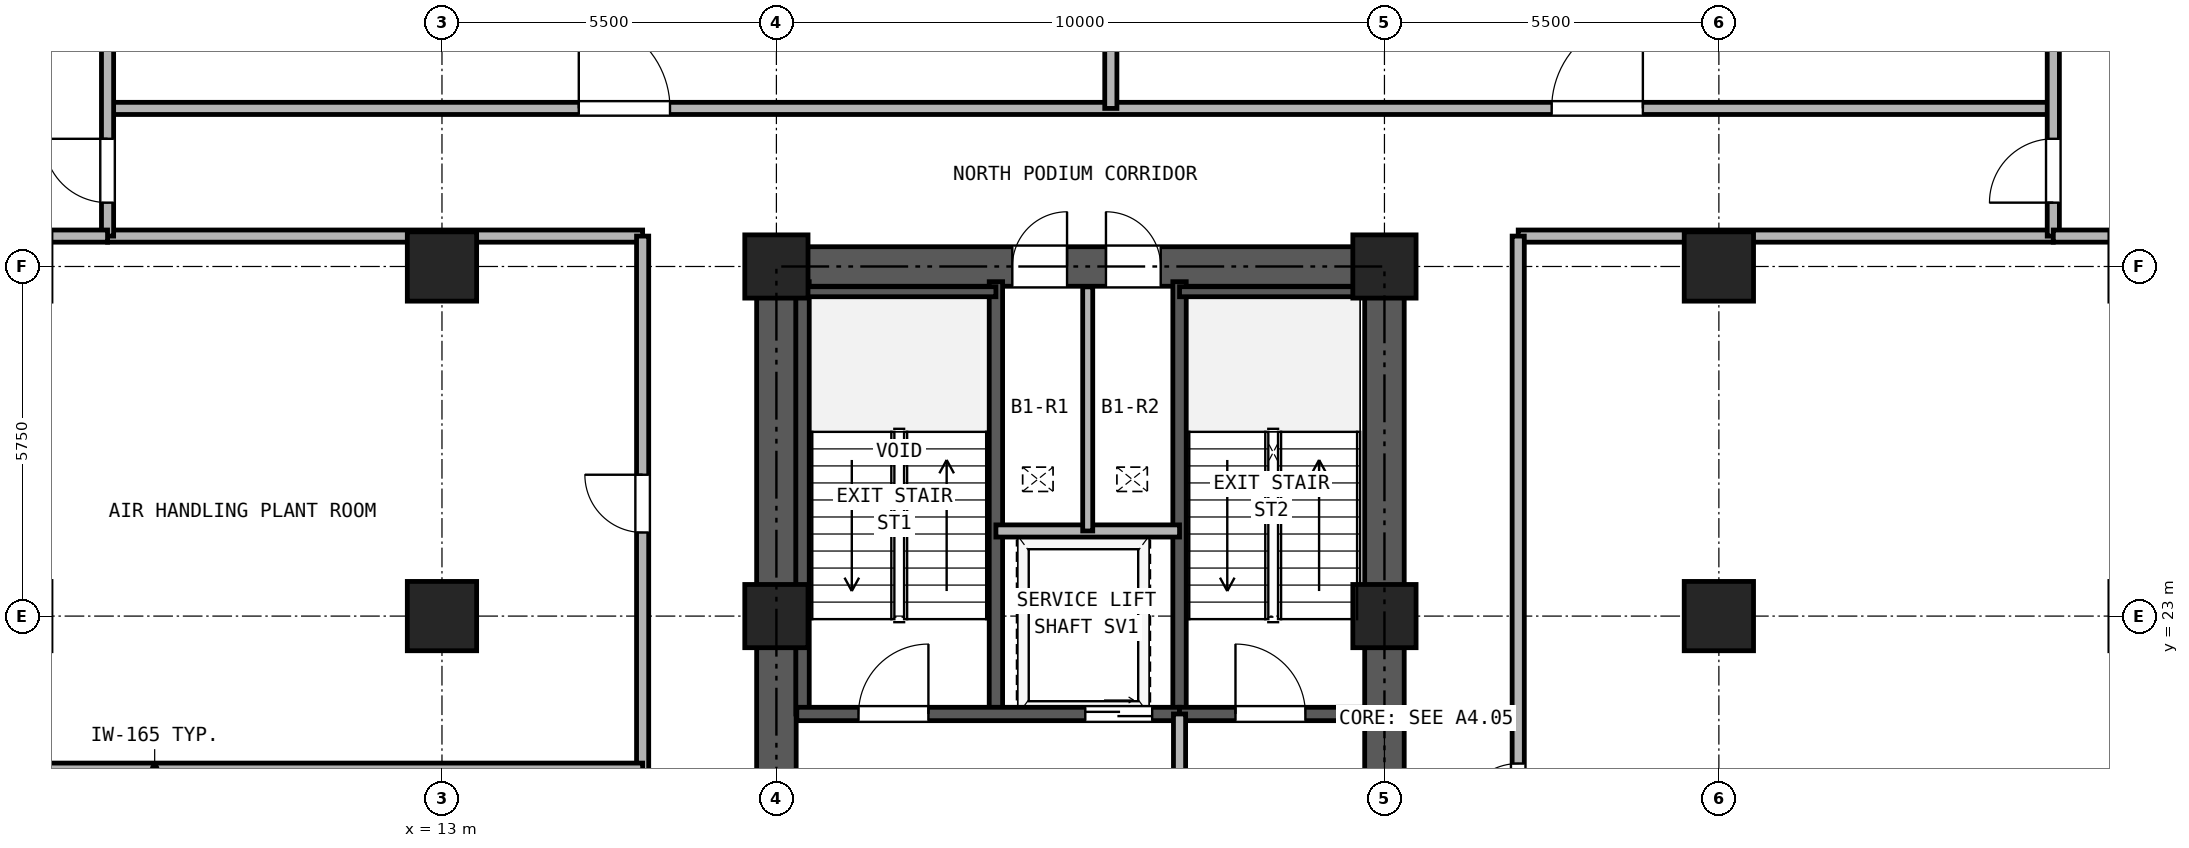
"""IFC4 building model, lengths in metres.
Left out: names, types, materials, properties, quantities, classifications, styles, units other than length and angle.
Written with IfcOpenShell. Run it as: python <this file> out.ifc"""

import sys

from ifc_helpers import new_model, si_unit, direction, frame, frame_2d, origin, origin_2d, place, context, subcontext, project, spatial, rectangle, hollow_rectangle, extrude, source, transform, mapped, element, fill, save


model = new_model("IFC4")
c1 = context("Model", 3, precision=1e-05, world=origin(), true_north=direction((0.0, 1.0)))
c2 = subcontext(c1, "Body", "Model", "MODEL_VIEW")
j1 = project(units=[si_unit("LENGTHUNIT", "METRE"), si_unit("PLANEANGLEUNIT", "RADIAN")], contexts=[c1])
p1 = place(None, origin())
s1 = spatial("IfcSite", under=j1, at=p1, CompositionType="ELEMENT")
p2 = place(p1, origin())
s2 = spatial("IfcBuilding", under=s1, at=p2, CompositionType="ELEMENT")
p3 = place(p2, frame((0.0, 0.0, -4.2)))
s3 = spatial("IfcBuildingStorey", under=s2, at=p3, CompositionType="ELEMENT", Elevation=-4.2)
m1 = source(origin(), c2, "Body", "SweptSolid", [
    extrude(hollow_rectangle(XDim=1.14, YDim=1.14, WallThickness=0.07, at=origin_2d()), origin(), (0.0, 0.0, 1.0), 3.88),
])
for number, where, z_axis, x_axis in (
    (1, (13.0, 23.0, 0.0), (0.0, 0.0, 1.0), (1.0, 0.0, 0.0)),
    (2, (13.0, 28.75, 0.0), (0.0, 0.0, 1.0), (1.0, 0.0, 0.0)),
):
    element("IfcColumn", number, at=place(p3, frame(where, z_axis=z_axis, x_axis=x_axis)), inside=s3, PredefinedType="COLUMN", context=c2, shape_type="MappedRepresentation", body=[
        mapped(m1, transform((0.0, 0.0, 0.0), x_axis=(1.0, 0.0, 0.0), y_axis=(0.0, 1.0, 0.0), z_axis=(0.0, 0.0, 1.0), scale=1.0)),
    ])
m2 = source(origin(), c2, "Body", "SweptSolid", [
    extrude(hollow_rectangle(XDim=1.04, YDim=1.04, WallThickness=0.065, at=origin_2d()), origin(), (0.0, 0.0, 1.0), 3.88),
])
for number, where, z_axis, x_axis in (
    (3, (18.5, 23.0, 0.0), (0.0, 0.0, 1.0), (1.0, 0.0, 0.0)),
    (4, (18.5, 28.75, 0.0), (0.0, 0.0, 1.0), (1.0, 0.0, 0.0)),
    (5, (28.5, 23.0, 0.0), (0.0, 0.0, 1.0), (1.0, 0.0, 0.0)),
    (6, (28.5, 28.75, 0.0), (0.0, 0.0, 1.0), (1.0, 0.0, 0.0)),
):
    element("IfcColumn", number, at=place(p3, frame(where, z_axis=z_axis, x_axis=x_axis)), inside=s3, PredefinedType="COLUMN", context=c2, shape_type="MappedRepresentation", body=[
        mapped(m2, transform((0.0, 0.0, 0.0), x_axis=(1.0, 0.0, 0.0), y_axis=(0.0, 1.0, 0.0), z_axis=(0.0, 0.0, 1.0), scale=1.0)),
    ])
for number, where, z_axis, x_axis in (
    (7, (34.0, 23.0, 0.0), (0.0, 0.0, 1.0), (1.0, 0.0, 0.0)),
    (8, (34.0, 28.75, 0.0), (0.0, 0.0, 1.0), (1.0, 0.0, 0.0)),
):
    element("IfcColumn", number, at=place(p3, frame(where, z_axis=z_axis, x_axis=x_axis)), inside=s3, PredefinedType="COLUMN", context=c2, shape_type="MappedRepresentation", body=[
        mapped(m1, transform((0.0, 0.0, 0.0), x_axis=(1.0, 0.0, 0.0), y_axis=(0.0, 1.0, 0.0), z_axis=(0.0, 0.0, 1.0), scale=1.0)),
    ])
p4 = place(p3, frame((18.175, 28.75, 0.0), z_axis=(0.0, 0.0, 1.0), x_axis=(1.0, 0.0, 0.0)))
e9 = element("IfcWall", 9, at=p4, inside=s3, PredefinedType="SHEAR", context=c2, shape_type="SweptSolid", body=[
    extrude(rectangle(XDim=10.65, YDim=0.65, at=frame_2d((5.325, 0.0))), origin(), (0.0, 0.0, 1.0), 3.88),
])
p5 = place(p4, frame((4.205, 0.0, 0.0)))
e10 = element("IfcOpeningElement", 10, at=p5, cuts=e9, PredefinedType="OPENING", context=c2, shape_type="SweptSolid", body=[
    extrude(rectangle(XDim=0.9, YDim=2.05, at=frame_2d((0.45, 1.025))), frame((0.0, 0.335, 0.0), z_axis=(0.0, -1.0, 0.0), x_axis=(1.0, 0.0, 0.0)), (0.0, 0.0, 1.0), 0.67),
])
p6 = place(p4, frame((5.745, 0.0, 0.0)))
e11 = element("IfcOpeningElement", 11, at=p6, cuts=e9, PredefinedType="OPENING", context=c2, shape_type="SweptSolid", body=[
    extrude(rectangle(XDim=0.9, YDim=2.05, at=frame_2d((0.45, 1.025))), frame((0.0, 0.335, 0.0), z_axis=(0.0, -1.0, 0.0), x_axis=(1.0, 0.0, 0.0)), (0.0, 0.0, 1.0), 0.67),
])
p7 = place(p3, frame((18.5, 11.825, 0.0), z_axis=(0.0, 0.0, 1.0), x_axis=(0.0, 1.0, 0.0)))
e12 = element("IfcWall", 12, at=p7, inside=s3, PredefinedType="SHEAR", context=c2, shape_type="SweptSolid", body=[
    extrude(rectangle(XDim=16.6, YDim=0.65, at=frame_2d((8.3, 0.0))), origin(), (0.0, 0.0, 1.0), 3.88),
])
p8 = place(p7, frame((7.325, 0.0, 0.0)))
e13 = element("IfcOpeningElement", 13, at=p8, cuts=e12, PredefinedType="OPENING", context=c2, shape_type="SweptSolid", body=[
    extrude(rectangle(XDim=1.15, YDim=2.2, at=frame_2d((0.575, 1.1))), frame((0.0, 0.335, 0.0), z_axis=(0.0, -1.0, 0.0), x_axis=(1.0, 0.0, 0.0)), (0.0, 0.0, 1.0), 0.67),
])
p9 = place(p3, frame((28.5, 11.825, 0.0), z_axis=(0.0, 0.0, 1.0), x_axis=(0.0, 1.0, 0.0)))
e14 = element("IfcWall", 14, at=p9, inside=s3, PredefinedType="SHEAR", context=c2, shape_type="SweptSolid", body=[
    extrude(rectangle(XDim=16.6, YDim=0.65, at=frame_2d((8.3, 0.0))), origin(), (0.0, 0.0, 1.0), 3.88),
])
p10 = place(p9, frame((7.325, 0.0, 0.0)))
e15 = element("IfcOpeningElement", 15, at=p10, cuts=e14, PredefinedType="OPENING", context=c2, shape_type="SweptSolid", body=[
    extrude(rectangle(XDim=1.15, YDim=2.2, at=frame_2d((0.575, 1.1))), frame((0.0, 0.335, 0.0), z_axis=(0.0, -1.0, 0.0), x_axis=(1.0, 0.0, 0.0)), (0.0, 0.0, 1.0), 0.67),
])
for number, where, z_axis, x_axis in (
    (16, (18.93, 21.39, 0.0), (0.0, 0.0, 1.0), (0.0, 1.0, 0.0)),
    (17, (22.11, 21.39, 0.0), (0.0, 0.0, 1.0), (0.0, 1.0, 0.0)),
    (18, (25.13, 21.39, 0.0), (0.0, 0.0, 1.0), (0.0, 1.0, 0.0)),
):
    element("IfcWall", number, at=place(p3, frame(where, z_axis=z_axis, x_axis=x_axis)), inside=s3, PredefinedType="SOLIDWALL", context=c2, shape_type="SweptSolid", body=[
        extrude(rectangle(XDim=7.11, YDim=0.22, at=frame_2d((3.555, 0.0))), origin(), (0.0, 0.0, 1.0), 3.88),
    ])
p11 = place(p3, frame((18.835, 28.335, 0.0), z_axis=(0.0, 0.0, 1.0), x_axis=(1.0, 0.0, 0.0)))
e19 = element("IfcWall", 19, at=p11, inside=s3, PredefinedType="PARTITIONING", context=c2, shape_type="SweptSolid", body=[
    extrude(rectangle(XDim=3.275, YDim=0.165, at=frame_2d((1.638, 0.0))), origin(), (0.0, 0.0, 1.0), 3.88),
])
p12 = place(p3, frame((25.13, 28.335, 0.0), z_axis=(0.0, 0.0, 1.0), x_axis=(1.0, 0.0, 0.0)))
e20 = element("IfcWall", 20, at=p12, inside=s3, PredefinedType="PARTITIONING", context=c2, shape_type="SweptSolid", body=[
    extrude(rectangle(XDim=3.035, YDim=0.165, at=frame_2d((1.518, 0.0))), origin(), (0.0, 0.0, 1.0), 3.88),
])
p13 = place(p3, frame((18.835, 21.39, 0.0), z_axis=(0.0, 0.0, 1.0), x_axis=(1.0, 0.0, 0.0)))
e21 = element("IfcWall", 21, at=p13, inside=s3, PredefinedType="SOLIDWALL", context=c2, shape_type="SweptSolid", body=[
    extrude(rectangle(XDim=6.295, YDim=0.22, at=frame_2d((3.147, 0.0))), origin(), (0.0, 0.0, 1.0), 3.88),
])
p14 = place(p13, frame((1.015, 0.0, 0.0)))
e22 = element("IfcOpeningElement", 22, at=p14, cuts=e21, PredefinedType="OPENING", context=c2, shape_type="SweptSolid", body=[
    extrude(rectangle(XDim=1.15, YDim=2.2, at=frame_2d((0.575, 1.1))), frame((0.0, 0.12, 0.0), z_axis=(0.0, -1.0, 0.0), x_axis=(1.0, 0.0, 0.0)), (0.0, 0.0, 1.0), 0.24),
])
p15 = place(p13, frame((4.745, 0.0, 0.0)))
e23 = element("IfcOpeningElement", 23, at=p15, cuts=e21, PredefinedType="OPENING", context=c2, shape_type="SweptSolid", body=[
    extrude(rectangle(XDim=1.1, YDim=2.25, at=frame_2d((0.55, 1.125))), frame((0.0, 0.12, 0.0), z_axis=(0.0, -1.0, 0.0), x_axis=(1.0, 0.0, 0.0)), (0.0, 0.0, 1.0), 0.24),
])
p16 = place(p3, frame((25.13, 21.39, 0.0), z_axis=(0.0, 0.0, 1.0), x_axis=(1.0, 0.0, 0.0)))
e24 = element("IfcWall", 24, at=p16, inside=s3, PredefinedType="SOLIDWALL", context=c2, shape_type="SweptSolid", body=[
    extrude(rectangle(XDim=3.035, YDim=0.22, at=frame_2d((1.518, 0.0))), origin(), (0.0, 0.0, 1.0), 3.88),
])
p17 = place(p16, frame((0.92, 0.0, 0.0)))
e25 = element("IfcOpeningElement", 25, at=p17, cuts=e24, PredefinedType="OPENING", context=c2, shape_type="SweptSolid", body=[
    extrude(rectangle(XDim=1.15, YDim=2.2, at=frame_2d((0.575, 1.1))), frame((0.0, 0.12, 0.0), z_axis=(0.0, -1.0, 0.0), x_axis=(1.0, 0.0, 0.0)), (0.0, 0.0, 1.0), 0.24),
])
p18 = place(p3, frame((22.11, 24.4, 0.0), z_axis=(0.0, 0.0, 1.0), x_axis=(1.0, 0.0, 0.0)))
e26 = element("IfcWall", 26, at=p18, inside=s3, PredefinedType="PARTITIONING", context=c2, shape_type="SweptSolid", body=[
    extrude(rectangle(XDim=3.02, YDim=0.2, at=frame_2d((1.51, 0.0))), origin(), (0.0, 0.0, 1.0), 3.88),
])
p19 = place(p3, frame((23.62, 24.4, 0.0), z_axis=(0.0, 0.0, 1.0), x_axis=(0.0, 1.0, 0.0)))
e27 = element("IfcWall", 27, at=p19, inside=s3, PredefinedType="PARTITIONING", context=c2, shape_type="SweptSolid", body=[
    extrude(rectangle(XDim=4.015, YDim=0.165, at=frame_2d((2.008, 0.0))), origin(), (0.0, 0.0, 1.0), 3.88),
])
p20 = place(p3, frame((25.13, 18.0, 0.0), z_axis=(0.0, 0.0, 1.0), x_axis=(0.0, 1.0, 0.0)))
e28 = element("IfcWall", 28, at=p20, inside=s3, PredefinedType="PARTITIONING", context=c2, shape_type="SweptSolid", body=[
    extrude(rectangle(XDim=3.39, YDim=0.2, at=frame_2d((1.695, 0.0))), origin(), (0.0, 0.0, 1.0), 3.88),
])
p21 = place(p20, frame((1.1, 0.0, 0.0)))
e29 = element("IfcOpeningElement", 29, at=p21, cuts=e28, PredefinedType="OPENING", context=c2, shape_type="SweptSolid", body=[
    extrude(rectangle(XDim=1.15, YDim=2.2, at=frame_2d((0.575, 1.1))), frame((0.0, 0.11, 0.0), z_axis=(0.0, -1.0, 0.0), x_axis=(1.0, 0.0, 0.0)), (0.0, 0.0, 1.0), 0.22),
])
p22 = place(p3, frame((7.5, 31.35, 0.0), z_axis=(0.0, 0.0, 1.0), x_axis=(1.0, 0.0, 0.0)))
e30 = element("IfcWall", 30, at=p22, inside=s3, PredefinedType="PARTITIONING", context=c2, shape_type="SweptSolid", body=[
    extrude(rectangle(XDim=32.0, YDim=0.2, at=frame_2d((16.0, 0.0))), origin(), (0.0, 0.0, 1.0), 3.88),
])
p23 = place(p22, frame((7.75, 0.0, 0.0)))
e31 = element("IfcOpeningElement", 31, at=p23, cuts=e30, PredefinedType="OPENING", context=c2, shape_type="SweptSolid", body=[
    extrude(rectangle(XDim=1.5, YDim=2.25, at=frame_2d((0.75, 1.125))), frame((0.0, 0.11, 0.0), z_axis=(0.0, -1.0, 0.0), x_axis=(1.0, 0.0, 0.0)), (0.0, 0.0, 1.0), 0.22),
])
p24 = place(p22, frame((23.75, 0.0, 0.0)))
e32 = element("IfcOpeningElement", 32, at=p24, cuts=e30, PredefinedType="OPENING", context=c2, shape_type="SweptSolid", body=[
    extrude(rectangle(XDim=1.5, YDim=2.25, at=frame_2d((0.75, 1.125))), frame((0.0, 0.11, 0.0), z_axis=(0.0, -1.0, 0.0), x_axis=(1.0, 0.0, 0.0)), (0.0, 0.0, 1.0), 0.22),
])
for number, where, z_axis, x_axis in (
    (33, (7.5, 29.25, 0.0), (0.0, 0.0, 1.0), (1.0, 0.0, 0.0)),
    (34, (30.7, 29.25, 0.0), (0.0, 0.0, 1.0), (1.0, 0.0, 0.0)),
):
    element("IfcWall", number, at=place(p3, frame(where, z_axis=z_axis, x_axis=x_axis)), inside=s3, PredefinedType="PARTITIONING", context=c2, shape_type="SweptSolid", body=[
        extrude(rectangle(XDim=8.8, YDim=0.2, at=frame_2d((4.4, 0.0))), origin(), (0.0, 0.0, 1.0), 3.88),
    ])
p25 = place(p3, frame((16.3, 11.0, 0.0), z_axis=(0.0, 0.0, 1.0), x_axis=(0.0, 1.0, 0.0)))
e35 = element("IfcWall", 35, at=p25, inside=s3, PredefinedType="PARTITIONING", context=c2, shape_type="SweptSolid", body=[
    extrude(rectangle(XDim=18.25, YDim=0.2, at=frame_2d((9.125, 0.0))), origin(), (0.0, 0.0, 1.0), 3.88),
])
p26 = place(p25, frame((4.25, 0.0, 0.0)))
e36 = element("IfcOpeningElement", 36, at=p26, cuts=e35, PredefinedType="OPENING", context=c2, shape_type="SweptSolid", body=[
    extrude(rectangle(XDim=0.95, YDim=2.15, at=frame_2d((0.475, 1.075))), frame((0.0, 0.11, 0.0), z_axis=(0.0, -1.0, 0.0), x_axis=(1.0, 0.0, 0.0)), (0.0, 0.0, 1.0), 0.22),
])
p27 = place(p25, frame((13.375, 0.0, 0.0)))
e37 = element("IfcOpeningElement", 37, at=p27, cuts=e35, PredefinedType="OPENING", context=c2, shape_type="SweptSolid", body=[
    extrude(rectangle(XDim=0.95, YDim=2.15, at=frame_2d((0.475, 1.075))), frame((0.0, 0.11, 0.0), z_axis=(0.0, -1.0, 0.0), x_axis=(1.0, 0.0, 0.0)), (0.0, 0.0, 1.0), 0.22),
])
p28 = place(p3, frame((30.7, 11.0, 0.0), z_axis=(0.0, 0.0, 1.0), x_axis=(0.0, 1.0, 0.0)))
e38 = element("IfcWall", 38, at=p28, inside=s3, PredefinedType="PARTITIONING", context=c2, shape_type="SweptSolid", body=[
    extrude(rectangle(XDim=18.25, YDim=0.2, at=frame_2d((9.125, 0.0))), origin(), (0.0, 0.0, 1.0), 3.88),
])
p29 = place(p28, frame((8.625, 0.0, 0.0)))
e39 = element("IfcOpeningElement", 39, at=p29, cuts=e38, PredefinedType="OPENING", context=c2, shape_type="SweptSolid", body=[
    extrude(rectangle(XDim=0.95, YDim=2.15, at=frame_2d((0.475, 1.075))), frame((0.0, 0.11, 0.0), z_axis=(0.0, -1.0, 0.0), x_axis=(1.0, 0.0, 0.0)), (0.0, 0.0, 1.0), 0.22),
])
p30 = place(p3, frame((7.5, 29.25, 0.0), z_axis=(0.0, 0.0, 1.0), x_axis=(0.0, 1.0, 0.0)))
e40 = element("IfcWall", 40, at=p30, inside=s3, PredefinedType="PARTITIONING", context=c2, shape_type="SweptSolid", body=[
    extrude(rectangle(XDim=11.0, YDim=0.2, at=frame_2d((5.5, 0.0))), origin(), (0.0, 0.0, 1.0), 3.88),
])
p31 = place(p30, frame((0.55, 0.0, 0.0)))
e41 = element("IfcOpeningElement", 41, at=p31, cuts=e40, PredefinedType="OPENING", context=c2, shape_type="SweptSolid", body=[
    extrude(rectangle(XDim=1.05, YDim=2.15, at=frame_2d((0.525, 1.075))), frame((0.0, 0.11, 0.0), z_axis=(0.0, -1.0, 0.0), x_axis=(1.0, 0.0, 0.0)), (0.0, 0.0, 1.0), 0.22),
])
p32 = place(p3, frame((39.5, 29.25, 0.0), z_axis=(0.0, 0.0, 1.0), x_axis=(0.0, 1.0, 0.0)))
e42 = element("IfcWall", 42, at=p32, inside=s3, PredefinedType="PARTITIONING", context=c2, shape_type="SweptSolid", body=[
    extrude(rectangle(XDim=11.0, YDim=0.2, at=frame_2d((5.5, 0.0))), origin(), (0.0, 0.0, 1.0), 3.88),
])
p33 = place(p32, frame((0.55, 0.0, 0.0)))
e43 = element("IfcOpeningElement", 43, at=p33, cuts=e42, PredefinedType="OPENING", context=c2, shape_type="SweptSolid", body=[
    extrude(rectangle(XDim=1.05, YDim=2.15, at=frame_2d((0.525, 1.075))), frame((0.0, 0.11, 0.0), z_axis=(0.0, -1.0, 0.0), x_axis=(1.0, 0.0, 0.0)), (0.0, 0.0, 1.0), 0.22),
])
for number, where, z_axis, x_axis in (
    (44, (0.25, 29.25, 0.0), (0.0, 0.0, 1.0), (1.0, 0.0, 0.0)),
    (45, (39.5, 29.25, 0.0), (0.0, 0.0, 1.0), (1.0, 0.0, 0.0)),
):
    element("IfcWall", number, at=place(p3, frame(where, z_axis=z_axis, x_axis=x_axis)), inside=s3, PredefinedType="PARTITIONING", context=c2, shape_type="SweptSolid", body=[
        extrude(rectangle(XDim=7.25, YDim=0.2, at=frame_2d((3.625, 0.0))), origin(), (0.0, 0.0, 1.0), 3.88),
    ])
p34 = place(p3, frame((24.0, 31.35, 0.0), z_axis=(0.0, 0.0, 1.0), x_axis=(0.0, 1.0, 0.0)))
e46 = element("IfcWall", 46, at=p34, inside=s3, PredefinedType="PARTITIONING", context=c2, shape_type="SweptSolid", body=[
    extrude(rectangle(XDim=8.9, YDim=0.2, at=frame_2d((4.45, 0.0))), origin(), (0.0, 0.0, 1.0), 3.88),
])
p35 = place(p3, frame((0.25, 20.5, 0.0), z_axis=(0.0, 0.0, 1.0), x_axis=(1.0, 0.0, 0.0)))
e47 = element("IfcWall", 47, at=p35, inside=s3, PredefinedType="PARTITIONING", context=c2, shape_type="SweptSolid", body=[
    extrude(rectangle(XDim=16.05, YDim=0.165, at=frame_2d((8.025, 0.0))), origin(), (0.0, 0.0, 1.0), 3.88),
])
p36 = place(p14, frame((1.15, 0.0, 0.0), z_axis=(0.0, 0.0, 1.0), x_axis=(-1.0, 0.0, 0.0)))
e48 = element("IfcDoor", 48, at=p36, inside=s3, OperationType="SINGLE_SWING_RIGHT", PredefinedType="DOOR", context=c2, shape_type="SweptSolid", body=[
    extrude(rectangle(XDim=1.15, YDim=2.2, at=frame_2d((0.575, 1.1))), frame((0.0, 0.025, 0.0), z_axis=(0.0, -1.0, 0.0), x_axis=(1.0, 0.0, 0.0)), (0.0, 0.0, 1.0), 0.05),
])
fill(e22, e48)
p37 = place(p17, frame((1.15, 0.0, 0.0), z_axis=(0.0, 0.0, 1.0), x_axis=(-1.0, 0.0, 0.0)))
e49 = element("IfcDoor", 49, at=p37, inside=s3, OperationType="SINGLE_SWING_LEFT", PredefinedType="DOOR", context=c2, shape_type="SweptSolid", body=[
    extrude(rectangle(XDim=1.15, YDim=2.2, at=frame_2d((0.575, 1.1))), frame((0.0, 0.025, 0.0), z_axis=(0.0, -1.0, 0.0), x_axis=(1.0, 0.0, 0.0)), (0.0, 0.0, 1.0), 0.05),
])
fill(e25, e49)
p38 = place(p15, frame((1.1, 0.0, 0.0), z_axis=(0.0, 0.0, 1.0), x_axis=(-1.0, 0.0, 0.0)))
e50 = element("IfcDoor", 50, at=p38, inside=s3, OperationType="DOUBLE_DOOR_SLIDING", PredefinedType="DOOR", context=c2, shape_type="SweptSolid", body=[
    extrude(rectangle(XDim=1.1, YDim=2.25, at=frame_2d((0.55, 1.125))), frame((0.0, 0.025, 0.0), z_axis=(0.0, -1.0, 0.0), x_axis=(1.0, 0.0, 0.0)), (0.0, 0.0, 1.0), 0.05),
])
fill(e23, e50)
p39 = place(p5, origin())
e51 = element("IfcDoor", 51, at=p39, inside=s3, OperationType="SINGLE_SWING_RIGHT", PredefinedType="DOOR", context=c2, shape_type="SweptSolid", body=[
    extrude(rectangle(XDim=0.9, YDim=2.05, at=frame_2d((0.45, 1.025))), frame((0.0, 0.025, 0.0), z_axis=(0.0, -1.0, 0.0), x_axis=(1.0, 0.0, 0.0)), (0.0, 0.0, 1.0), 0.05),
])
fill(e10, e51)
p40 = place(p6, origin())
e52 = element("IfcDoor", 52, at=p40, inside=s3, OperationType="SINGLE_SWING_LEFT", PredefinedType="DOOR", context=c2, shape_type="SweptSolid", body=[
    extrude(rectangle(XDim=0.9, YDim=2.05, at=frame_2d((0.45, 1.025))), frame((0.0, 0.025, 0.0), z_axis=(0.0, -1.0, 0.0), x_axis=(1.0, 0.0, 0.0)), (0.0, 0.0, 1.0), 0.05),
])
fill(e11, e52)
p41 = place(p23, origin())
e53 = element("IfcDoor", 53, at=p41, inside=s3, OperationType="SINGLE_SWING_LEFT", PredefinedType="DOOR", context=c2, shape_type="SweptSolid", body=[
    extrude(rectangle(XDim=1.5, YDim=2.25, at=frame_2d((0.75, 1.125))), frame((0.0, 0.025, 0.0), z_axis=(0.0, -1.0, 0.0), x_axis=(1.0, 0.0, 0.0)), (0.0, 0.0, 1.0), 0.05),
])
fill(e31, e53)
p42 = place(p24, origin())
e54 = element("IfcDoor", 54, at=p42, inside=s3, OperationType="SINGLE_SWING_RIGHT", PredefinedType="DOOR", context=c2, shape_type="SweptSolid", body=[
    extrude(rectangle(XDim=1.5, YDim=2.25, at=frame_2d((0.75, 1.125))), frame((0.0, 0.025, 0.0), z_axis=(0.0, -1.0, 0.0), x_axis=(1.0, 0.0, 0.0)), (0.0, 0.0, 1.0), 0.05),
])
fill(e32, e54)
p43 = place(p31, frame((1.05, 0.0, 0.0), z_axis=(0.0, 0.0, 1.0), x_axis=(-1.0, 0.0, 0.0)))
e55 = element("IfcDoor", 55, at=p43, inside=s3, OperationType="SINGLE_SWING_RIGHT", PredefinedType="DOOR", context=c2, shape_type="SweptSolid", body=[
    extrude(rectangle(XDim=1.05, YDim=2.15, at=frame_2d((0.525, 1.075))), frame((0.0, 0.025, 0.0), z_axis=(0.0, -1.0, 0.0), x_axis=(1.0, 0.0, 0.0)), (0.0, 0.0, 1.0), 0.05),
])
fill(e41, e55)
p44 = place(p33, origin())
e56 = element("IfcDoor", 56, at=p44, inside=s3, OperationType="SINGLE_SWING_LEFT", PredefinedType="DOOR", context=c2, shape_type="SweptSolid", body=[
    extrude(rectangle(XDim=1.05, YDim=2.15, at=frame_2d((0.525, 1.075))), frame((0.0, 0.025, 0.0), z_axis=(0.0, -1.0, 0.0), x_axis=(1.0, 0.0, 0.0)), (0.0, 0.0, 1.0), 0.05),
])
fill(e43, e56)
p45 = place(p27, frame((0.95, 0.0, 0.0), z_axis=(0.0, 0.0, 1.0), x_axis=(-1.0, 0.0, 0.0)))
e57 = element("IfcDoor", 57, at=p45, inside=s3, OperationType="SINGLE_SWING_RIGHT", PredefinedType="DOOR", context=c2, shape_type="SweptSolid", body=[
    extrude(rectangle(XDim=0.95, YDim=2.15, at=frame_2d((0.475, 1.075))), frame((0.0, 0.025, 0.0), z_axis=(0.0, -1.0, 0.0), x_axis=(1.0, 0.0, 0.0)), (0.0, 0.0, 1.0), 0.05),
])
fill(e37, e57)
p46 = place(p29, origin())
e58 = element("IfcDoor", 58, at=p46, inside=s3, OperationType="SINGLE_SWING_LEFT", PredefinedType="DOOR", context=c2, shape_type="SweptSolid", body=[
    extrude(rectangle(XDim=0.95, YDim=2.15, at=frame_2d((0.475, 1.075))), frame((0.0, 0.025, 0.0), z_axis=(0.0, -1.0, 0.0), x_axis=(1.0, 0.0, 0.0)), (0.0, 0.0, 1.0), 0.05),
])
fill(e39, e58)
save(model, sys.argv[1])
